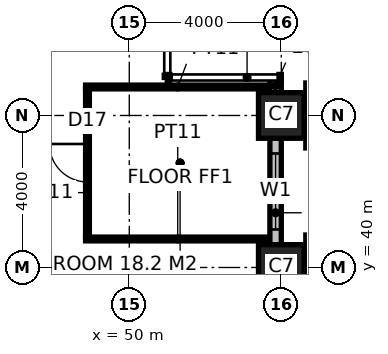
"""IFC4 building model, lengths in metres.
Left out: names, types, materials, properties, quantities, classifications, styles, units other than length and angle.
Written with IfcOpenShell. Run it as: python <this file> out.ifc"""

import sys

from ifc_helpers import new_model, si_unit, direction, frame, frame_2d, origin, origin_2d, place, context, subcontext, project, spatial, rectangle, hollow_rectangle, extrude, element, fill, save


model = new_model("IFC4")
c1 = context("Model", 3, precision=1e-05, world=origin(), true_north=direction((0.0, 1.0)))
c2 = subcontext(c1, "Body", "Model", "MODEL_VIEW")
j1 = project(units=[si_unit("LENGTHUNIT", "METRE"), si_unit("PLANEANGLEUNIT", "RADIAN")], contexts=[c1])
p1 = place(None, origin())
s1 = spatial("IfcSite", under=j1, at=p1, CompositionType="ELEMENT")
p2 = place(p1, origin())
s2 = spatial("IfcBuilding", under=s1, at=p2, CompositionType="ELEMENT")
p3 = place(p2, frame((0.0, 0.0, 59.0)))
s3 = spatial("IfcBuildingStorey", under=s2, at=p3, CompositionType="ELEMENT", Elevation=59.0)
for number, where, z_axis, x_axis in (
    (1, (54.0, 40.0, 0.0), (0.0, 0.0, 1.0), (1.0, 0.0, 0.0)),
    (2, (54.0, 44.0, 0.0), (0.0, 0.0, 1.0), (1.0, 0.0, 0.0)),
):
    element("IfcColumn", number, at=place(p3, frame(where, z_axis=z_axis, x_axis=x_axis)), inside=s3, PredefinedType="COLUMN", context=c2, shape_type="SweptSolid", body=[
        extrude(hollow_rectangle(XDim=1.2, YDim=1.2, WallThickness=0.1, at=origin_2d()), origin(), (0.0, 0.0, 1.0), 4.0),
    ])
for number, where, z_axis, x_axis in (
    (3, (48.85, 40.75, 0.0), (0.0, 0.0, 1.0), (1.0, 0.0, 0.0)),
    (4, (48.85, 44.75, 0.0), (0.0, 0.0, 1.0), (1.0, 0.0, 0.0)),
):
    element("IfcWall", number, at=place(p3, frame(where, z_axis=z_axis, x_axis=x_axis)), inside=s3, PredefinedType="PARTITIONING", context=c2, shape_type="SweptSolid", body=[
        extrude(rectangle(XDim=4.85, YDim=0.1, at=frame_2d((2.425, 0.0))), origin(), (0.0, 0.0, 1.0), 3.85),
    ])
p4 = place(p3, frame((48.9, 40.8, 0.0), z_axis=(0.0, 0.0, 1.0), x_axis=(0.0, 1.0, 0.0)))
e5 = element("IfcWall", 5, at=p4, inside=s3, PredefinedType="PARTITIONING", context=c2, shape_type="SweptSolid", body=[
    extrude(rectangle(XDim=3.9, YDim=0.1, at=frame_2d((1.95, 0.0))), origin(), (0.0, 0.0, 1.0), 3.85),
])
p5 = place(p4, frame((1.45, 0.0, 0.0)))
e6 = element("IfcOpeningElement", 6, at=p5, cuts=e5, PredefinedType="OPENING", context=c2, shape_type="SweptSolid", body=[
    extrude(rectangle(XDim=1.0, YDim=2.2, at=frame_2d((0.5, 1.1))), frame((0.0, 0.06, 0.0), z_axis=(0.0, -1.0, 0.0), x_axis=(1.0, 0.0, 0.0)), (0.0, 0.0, 1.0), 0.12),
])
p6 = place(p3, frame((53.85, 40.6, 0.0), z_axis=(0.0, 0.0, 1.0), x_axis=(0.0, 1.0, 0.0)))
e7 = element("IfcWall", 7, at=p6, inside=s3, PredefinedType="ELEMENTEDWALL", context=c2, shape_type="SweptSolid", body=[
    extrude(rectangle(XDim=2.8, YDim=0.3, at=frame_2d((1.4, 0.0))), origin(), (0.0, 0.0, 1.0), 2.85),
])
p7 = place(p6, frame((0.4, 0.0, 0.8)))
e8 = element("IfcOpeningElement", 8, at=p7, cuts=e7, PredefinedType="OPENING", context=c2, shape_type="SweptSolid", body=[
    extrude(rectangle(XDim=2.0, YDim=2.0, at=frame_2d((1.0, 1.0))), frame((0.0, 0.16, 0.0), z_axis=(0.0, -1.0, 0.0), x_axis=(1.0, 0.0, 0.0)), (0.0, 0.0, 1.0), 0.32),
])
p8 = place(p3, frame((53.85, 44.6, 0.0), z_axis=(0.0, 0.0, 1.0), x_axis=(0.0, 1.0, 0.0)))
e9 = element("IfcWall", 9, at=p8, inside=s3, PredefinedType="ELEMENTEDWALL", context=c2, shape_type="SweptSolid", body=[
    extrude(rectangle(XDim=0.37, YDim=0.3, at=frame_2d((0.185, 0.0))), origin(), (0.0, 0.0, 1.0), 2.95),
])
p9 = place(p5, origin())
e10 = element("IfcDoor", 10, at=p9, inside=s3, OperationType="SINGLE_SWING_RIGHT", PredefinedType="DOOR", context=c2, shape_type="SweptSolid", body=[
    extrude(rectangle(XDim=1.0, YDim=2.2, at=frame_2d((0.5, 1.1))), frame((0.0, 0.025, 0.0), z_axis=(0.0, -1.0, 0.0), x_axis=(1.0, 0.0, 0.0)), (0.0, 0.0, 1.0), 0.05),
])
fill(e6, e10)
p10 = place(p7, origin())
e11 = element("IfcWindow", 11, at=p10, inside=s3, PartitioningType="SINGLE_PANEL", PredefinedType="WINDOW", context=c2, shape_type="SweptSolid", body=[
    extrude(rectangle(XDim=2.0, YDim=2.0, at=frame_2d((1.0, 1.0))), frame((0.0, 0.03, 0.0), z_axis=(0.0, -1.0, 0.0), x_axis=(1.0, 0.0, 0.0)), (0.0, 0.0, 1.0), 0.06),
])
fill(e8, e11)
save(model, sys.argv[1])
